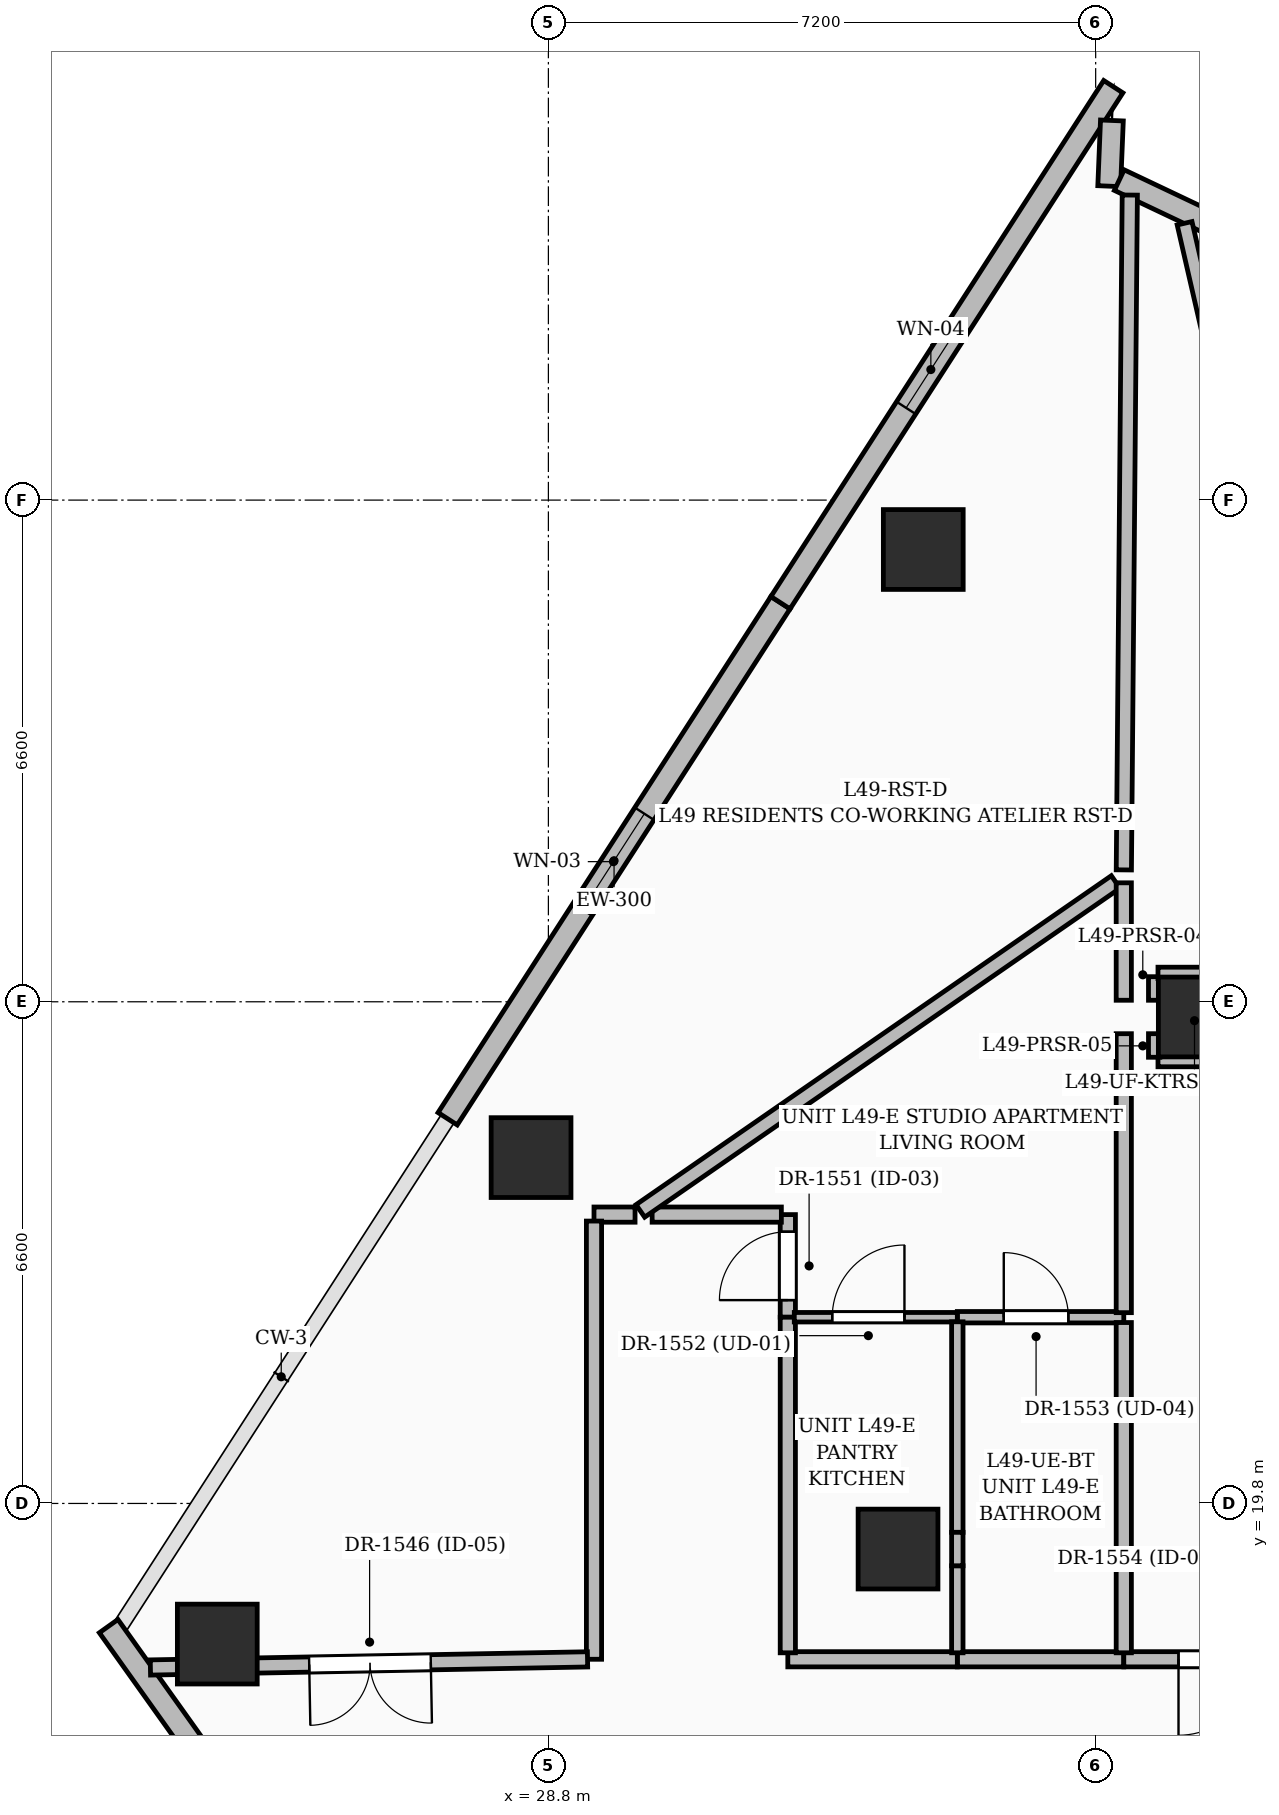
"""IFC4 building model, lengths in metres.
Left out: names, types, materials, properties, quantities, classifications, styles, units other than length and angle.
Written with IfcOpenShell. Run it as: python <this file> out.ifc"""

import sys

from ifc_helpers import new_model, si_unit, direction, frame, frame_2d, origin, origin_2d, place, context, subcontext, project, spatial, rectangle, extrude, element, fill, save


model = new_model("IFC4")
c1 = context("Model", 3, precision=1e-05, world=origin(), true_north=direction((0.0, 1.0)))
c2 = subcontext(c1, "Body", "Model", "MODEL_VIEW")
j1 = project(units=[si_unit("LENGTHUNIT", "METRE"), si_unit("PLANEANGLEUNIT", "RADIAN")], contexts=[c1])
p1 = place(None, origin())
s1 = spatial("IfcSite", under=j1, at=p1, CompositionType="ELEMENT")
p2 = place(p1, origin())
s2 = spatial("IfcBuilding", under=s1, at=p2, CompositionType="ELEMENT")
p3 = place(p2, frame((0.0, 0.0, 189.6)))
s3 = spatial("IfcBuildingStorey", under=s2, at=p3, CompositionType="ELEMENT", Elevation=189.6)
for number, where, z_axis, x_axis in (
    (1, (37.35, 26.2, 0.0), (0.0, 0.0, 1.0), (1.0, 0.0, 0.0)),
    (2, (33.4, 19.2, 0.0), (0.0, 0.0, 1.0), (1.0, 0.0, 0.0)),
    (3, (33.732, 32.35, 0.0), (0.0, 0.0, 1.0), (1.0, 0.0, 0.0)),
    (4, (28.572, 24.35, 0.0), (0.0, 0.0, 1.0), (1.0, 0.0, 0.0)),
    (5, (24.444, 17.95, 0.0), (0.0, 0.0, 1.0), (1.0, 0.0, 0.0)),
):
    element("IfcColumn", number, at=place(p3, frame(where, z_axis=z_axis, x_axis=x_axis)), inside=s3, PredefinedType="COLUMN", context=c2, shape_type="SweptSolid", body=[
        extrude(rectangle(XDim=1.05, YDim=1.05, at=origin_2d()), origin(), (0.0, 0.0, 1.0), 3.6),
    ])
p4 = place(p3, frame((24.52, 16.074, 0.0), z_axis=(0.0, 0.0, 1.0), x_axis=(-0.580472212384, 0.814280056645, 0.0)))
e6 = element("IfcWall", 6, at=p4, inside=s3, PredefinedType="SOLIDWALL", context=c2, shape_type="SweptSolid", body=[
    extrude(rectangle(XDim=2.594, YDim=0.3, at=frame_2d((1.297, 0.0))), origin(), (0.0, 0.0, 1.0), 2.575),
])
p5 = place(p3, frame((27.475, 24.861, 0.0), z_axis=(0.0, 0.0, 1.0), x_axis=(0.542020169158, 0.840365477769, 0.0)))
e7 = element("IfcWall", 7, at=p5, inside=s3, PredefinedType="SOLIDWALL", context=c2, shape_type="SweptSolid", body=[
    extrude(rectangle(XDim=8.078, YDim=0.3, at=frame_2d((4.039, 0.0))), origin(), (0.0, 0.0, 1.0), 3.35),
])
p6 = place(p5, frame((3.275, 0.0, 0.6)))
e8 = element("IfcOpeningElement", 8, at=p6, cuts=e7, PredefinedType="OPENING", context=c2, shape_type="SweptSolid", body=[
    extrude(rectangle(XDim=1.5, YDim=2.1, at=frame_2d((0.75, 1.05))), frame((0.0, 0.16, 0.0), z_axis=(0.0, -1.0, 0.0), x_axis=(1.0, 0.0, 0.0)), (0.0, 0.0, 1.0), 0.32),
])
p7 = place(p3, frame((31.853, 31.65, 0.0), z_axis=(0.0, 0.0, 1.0), x_axis=(0.542006403754, 0.84037435604, 0.0)))
e9 = element("IfcWall", 9, at=p7, inside=s3, PredefinedType="SOLIDWALL", context=c2, shape_type="SweptSolid", body=[
    extrude(rectangle(XDim=8.079, YDim=0.3, at=frame_2d((4.039, 0.0))), origin(), (0.0, 0.0, 1.0), 3.35),
])
p8 = place(p7, frame((3.05, 0.0, 0.8)))
e10 = element("IfcOpeningElement", 10, at=p8, cuts=e9, PredefinedType="OPENING", context=c2, shape_type="SweptSolid", body=[
    extrude(rectangle(XDim=1.2, YDim=1.8, at=frame_2d((0.6, 0.9))), frame((0.0, 0.16, 0.0), z_axis=(0.0, -1.0, 0.0), x_axis=(1.0, 0.0, 0.0)), (0.0, 0.0, 1.0), 0.32),
])
p9 = place(p3, frame((36.214, 37.994, 0.0), z_axis=(0.0, 0.0, 1.0), x_axis=(-0.040926134278, -0.999162174791, 0.0)))
e11 = element("IfcWall", 11, at=p9, inside=s3, PredefinedType="SOLIDWALL", context=c2, shape_type="SweptSolid", body=[
    extrude(rectangle(XDim=0.865, YDim=0.3, at=frame_2d((0.433, 0.0))), origin(), (0.0, 0.0, 1.0), 3.35),
])
p10 = place(p3, frame((36.311, 37.21, 0.0), z_axis=(0.0, 0.0, 1.0), x_axis=(0.903471604204, -0.428647944585, 0.0)))
e12 = element("IfcWall", 12, at=p10, inside=s3, PredefinedType="SOLIDWALL", context=c2, shape_type="SweptSolid", body=[
    extrude(rectangle(XDim=2.205, YDim=0.3, at=frame_2d((1.103, 0.0))), origin(), (0.0, 0.0, 1.0), 3.35),
])
p11 = place(p3, frame((29.94, 23.6, 0.0), z_axis=(0.0, 0.0, 1.0), x_axis=(-1.0, 0.0, 0.0)))
e13 = element("IfcWall", 13, at=p11, inside=s3, PredefinedType="PARTITIONING", context=c2, shape_type="SweptSolid", body=[
    extrude(rectangle(XDim=0.54, YDim=0.2, at=frame_2d((0.27, 0.0))), origin(), (0.0, 0.0, 1.0), 2.464),
])
p12 = place(p3, frame((29.4, 23.515, 0.0), z_axis=(0.0, 0.0, 1.0), x_axis=(0.0, -1.0, 0.0)))
e14 = element("IfcWall", 14, at=p12, inside=s3, PredefinedType="PARTITIONING", context=c2, shape_type="SweptSolid", body=[
    extrude(rectangle(XDim=5.765, YDim=0.2, at=frame_2d((2.882, 0.0))), origin(), (0.0, 0.0, 1.0), 2.464),
])
p13 = place(p3, frame((29.315, 17.749, 0.0), z_axis=(0.0, 0.0, 1.0), x_axis=(-0.999827964646, -0.018548345243, 0.0)))
e15 = element("IfcWall", 15, at=p13, inside=s3, PredefinedType="PARTITIONING", context=c2, shape_type="SweptSolid", body=[
    extrude(rectangle(XDim=5.752, YDim=0.2, at=frame_2d((2.876, 0.0))), origin(), (0.0, 0.0, 1.0), 2.464),
])
p14 = place(p13, frame((2.062, 0.0, 0.0)))
e16 = element("IfcOpeningElement", 16, at=p14, cuts=e15, PredefinedType="OPENING", context=c2, shape_type="SweptSolid", body=[
    extrude(rectangle(XDim=1.6, YDim=2.3, at=frame_2d((0.8, 1.15))), frame((0.0, 0.11, 0.0), z_axis=(0.0, -1.0, 0.0), x_axis=(1.0, 0.0, 0.0)), (0.0, 0.0, 1.0), 0.22),
])
p15 = place(p3, frame((31.95, 22.25, 0.0), z_axis=(0.0, 0.0, 1.0), x_axis=(0.0, 1.0, 0.0)))
e17 = element("IfcWall", 17, at=p15, inside=s3, PredefinedType="PARTITIONING", context=c2, shape_type="SweptSolid", body=[
    extrude(rectangle(XDim=1.35, YDim=0.2, at=frame_2d((0.675, 0.0))), origin(), (0.0, 0.0, 1.0), 2.712),
])
p16 = place(p15, frame((0.225, 0.0, 0.0)))
e18 = element("IfcOpeningElement", 18, at=p16, cuts=e17, PredefinedType="OPENING", context=c2, shape_type="SweptSolid", body=[
    extrude(rectangle(XDim=0.9, YDim=2.1, at=frame_2d((0.45, 1.05))), frame((0.0, 0.11, 0.0), z_axis=(0.0, -1.0, 0.0), x_axis=(1.0, 0.0, 0.0)), (0.0, 0.0, 1.0), 0.22),
])
p17 = place(p3, frame((31.865, 23.6, 0.0), z_axis=(0.0, 0.0, 1.0), x_axis=(-1.0, 0.0, 0.0)))
e19 = element("IfcWall", 19, at=p17, inside=s3, PredefinedType="PARTITIONING", context=c2, shape_type="SweptSolid", body=[
    extrude(rectangle(XDim=1.7, YDim=0.2, at=frame_2d((0.85, 0.0))), origin(), (0.0, 0.0, 1.0), 3.35),
])
p18 = place(p3, frame((36.37, 17.75, 0.0), z_axis=(0.0, 0.0, 1.0), x_axis=(-1.0, 0.0, 0.0)))
e20 = element("IfcWall", 20, at=p18, inside=s3, PredefinedType="PARTITIONING", context=c2, shape_type="SweptSolid", body=[
    extrude(rectangle(XDim=2.19, YDim=0.2, at=frame_2d((1.095, 0.0))), origin(), (0.0, 0.0, 1.0), 2.436),
])
p19 = place(p3, frame((34.18, 17.75, 0.0), z_axis=(0.0, 0.0, 1.0), x_axis=(-1.0, 0.0, 0.0)))
e21 = element("IfcWall", 21, at=p19, inside=s3, PredefinedType="PARTITIONING", context=c2, shape_type="SweptSolid", body=[
    extrude(rectangle(XDim=2.23, YDim=0.2, at=frame_2d((1.115, 0.0))), origin(), (0.0, 0.0, 1.0), 2.436),
])
p20 = place(p3, frame((31.95, 17.835, 0.0), z_axis=(0.0, 0.0, 1.0), x_axis=(0.0, 1.0, 0.0)))
e22 = element("IfcWall", 22, at=p20, inside=s3, PredefinedType="PARTITIONING", context=c2, shape_type="SweptSolid", body=[
    extrude(rectangle(XDim=4.415, YDim=0.2, at=frame_2d((2.208, 0.0))), origin(), (0.0, 0.0, 1.0), 2.464),
])
p21 = place(p3, frame((38.81, 17.75, 0.0), z_axis=(0.0, 0.0, 1.0), x_axis=(-1.0, 0.0, 0.0)))
e23 = element("IfcWall", 23, at=p21, inside=s3, PredefinedType="PARTITIONING", context=c2, shape_type="SweptSolid", body=[
    extrude(rectangle(XDim=2.44, YDim=0.2, at=frame_2d((1.22, 0.0))), origin(), (0.0, 0.0, 1.0), 3.35),
])
p22 = place(p21, frame((0.72, 0.0, 0.0)))
e24 = element("IfcOpeningElement", 24, at=p22, cuts=e23, PredefinedType="OPENING", context=c2, shape_type="SweptSolid", body=[
    extrude(rectangle(XDim=1.0, YDim=2.2, at=frame_2d((0.5, 1.1))), frame((0.0, 0.11, 0.0), z_axis=(0.0, -1.0, 0.0), x_axis=(1.0, 0.0, 0.0)), (0.0, 0.0, 1.0), 0.22),
])
p23 = place(p3, frame((30.01, 23.648, 0.0), z_axis=(0.0, 0.0, 1.0), x_axis=(0.822283485257, 0.569078087677, 0.0)))
e25 = element("IfcWall", 25, at=p23, inside=s3, PredefinedType="PARTITIONING", context=c2, shape_type="SweptSolid", body=[
    extrude(rectangle(XDim=7.605, YDim=0.2, at=frame_2d((3.802, 0.0))), origin(), (0.0, 0.0, 1.0), 2.464),
])
p24 = place(p3, frame((36.371, 28.135, 0.0), z_axis=(0.0, 0.0, 1.0), x_axis=(0.008827067816, 0.999961040678, 0.0)))
e26 = element("IfcWall", 26, at=p24, inside=s3, PredefinedType="PARTITIONING", context=c2, shape_type="SweptSolid", body=[
    extrude(rectangle(XDim=8.878, YDim=0.2, at=frame_2d((4.439, 0.0))), origin(), (0.0, 0.0, 1.0), 2.464),
])
p25 = place(p3, frame((34.18, 22.25, 0.0), z_axis=(0.0, 0.0, 1.0), x_axis=(1.0, 0.0, 0.0)))
e27 = element("IfcWall", 27, at=p25, inside=s3, PredefinedType="PARTITIONING", context=c2, shape_type="SweptSolid", body=[
    extrude(rectangle(XDim=2.19, YDim=0.15, at=frame_2d((1.095, 0.0))), origin(), (0.0, 0.0, 1.0), 2.436),
])
p26 = place(p25, frame((0.611, 0.0, 0.0)))
e28 = element("IfcOpeningElement", 28, at=p26, cuts=e27, PredefinedType="OPENING", context=c2, shape_type="SweptSolid", body=[
    extrude(rectangle(XDim=0.85, YDim=2.1, at=frame_2d((0.425, 1.05))), frame((0.0, 0.085, 0.0), z_axis=(0.0, -1.0, 0.0), x_axis=(1.0, 0.0, 0.0)), (0.0, 0.0, 1.0), 0.17),
])
p27 = place(p3, frame((32.035, 22.25, 0.0), z_axis=(0.0, 0.0, 1.0), x_axis=(1.0, 0.0, 0.0)))
e29 = element("IfcWall", 29, at=p27, inside=s3, PredefinedType="PARTITIONING", context=c2, shape_type="SweptSolid", body=[
    extrude(rectangle(XDim=2.145, YDim=0.125, at=frame_2d((1.073, 0.0))), origin(), (0.0, 0.0, 1.0), 2.712),
])
p28 = place(p27, frame((0.5, 0.0, 0.0)))
e30 = element("IfcOpeningElement", 30, at=p28, cuts=e29, PredefinedType="OPENING", context=c2, shape_type="SweptSolid", body=[
    extrude(rectangle(XDim=0.95, YDim=2.2, at=frame_2d((0.475, 1.1))), frame((0.0, 0.072, 0.0), z_axis=(0.0, -1.0, 0.0), x_axis=(1.0, 0.0, 0.0)), (0.0, 0.0, 1.0), 0.145),
])
p29 = place(p3, frame((36.37, 22.31, 0.0), z_axis=(0.0, 0.0, 1.0), x_axis=(0.0, 1.0, 0.0)))
e31 = element("IfcWall", 31, at=p29, inside=s3, PredefinedType="PARTITIONING", context=c2, shape_type="SweptSolid", body=[
    extrude(rectangle(XDim=3.67, YDim=0.2, at=frame_2d((1.835, 0.0))), origin(), (0.0, 0.0, 1.0), 2.436),
])
p30 = place(p3, frame((36.37, 26.42, 0.0), z_axis=(0.0, 0.0, 1.0), x_axis=(0.0, 1.0, 0.0)))
e32 = element("IfcWall", 32, at=p30, inside=s3, PredefinedType="PARTITIONING", context=c2, shape_type="SweptSolid", body=[
    extrude(rectangle(XDim=1.545, YDim=0.2, at=frame_2d((0.772, 0.0))), origin(), (0.0, 0.0, 1.0), 2.464),
])
p31 = place(p3, frame((34.18, 18.98, 0.0), z_axis=(0.0, 0.0, 1.0), x_axis=(0.0, -1.0, 0.0)))
e33 = element("IfcWall", 33, at=p31, inside=s3, PredefinedType="PARTITIONING", context=c2, shape_type="SweptSolid", body=[
    extrude(rectangle(XDim=1.145, YDim=0.15, at=frame_2d((0.573, 0.0))), origin(), (0.0, 0.0, 1.0), 2.436),
])
p32 = place(p3, frame((34.18, 22.19, 0.0), z_axis=(0.0, 0.0, 1.0), x_axis=(0.0, -1.0, 0.0)))
e34 = element("IfcWall", 34, at=p32, inside=s3, PredefinedType="PARTITIONING", context=c2, shape_type="SweptSolid", body=[
    extrude(rectangle(XDim=2.77, YDim=0.15, at=frame_2d((1.385, 0.0))), origin(), (0.0, 0.0, 1.0), 2.436),
])
p33 = place(p3, frame((36.37, 17.835, 0.0), z_axis=(0.0, 0.0, 1.0), x_axis=(0.0, 1.0, 0.0)))
e35 = element("IfcWall", 35, at=p33, inside=s3, PredefinedType="PARTITIONING", context=c2, shape_type="SweptSolid", body=[
    extrude(rectangle(XDim=4.345, YDim=0.2, at=frame_2d((2.172, 0.0))), origin(), (0.0, 0.0, 1.0), 2.853),
])
p34 = place(p3, frame((38.81, 29.51, 0.0), z_axis=(0.0, 0.0, 1.0), x_axis=(-0.224116325186, 0.974562400663, 0.0)))
e36 = element("IfcWall", 36, at=p34, inside=s3, PredefinedType="PARTITIONING", context=c2, shape_type="SweptSolid", body=[
    extrude(rectangle(XDim=7.318, YDim=0.2, at=frame_2d((3.659, 0.0))), origin(), (0.0, 0.0, 1.0), 2.57),
])
p35 = place(p3, frame((34.18, 19.42, 0.0), z_axis=(0.0, 0.0, 1.0), x_axis=(0.0, -1.0, 0.0)))
e37 = element("IfcWall", 37, at=p35, inside=s3, PredefinedType="PARTITIONING", context=c2, shape_type="SweptSolid", body=[
    extrude(rectangle(XDim=0.44, YDim=0.15, at=frame_2d((0.22, 0.0))), origin(), (0.0, 0.0, 1.0), 2.853),
])
p36 = place(p3, frame((36.77, 26.42, 0.0), z_axis=(0.0, 0.0, 1.0), x_axis=(0.0, 1.0, 0.0)))
e38 = element("IfcWall", 38, at=p36, inside=s3, PredefinedType="PARTITIONING", context=c2, shape_type="SweptSolid", body=[
    extrude(rectangle(XDim=0.31, YDim=0.15, at=frame_2d((0.155, 0.0))), origin(), (0.0, 0.0, 1.0), 2.464),
])
p37 = place(p3, frame((36.82, 26.78, 0.0), z_axis=(0.0, 0.0, 1.0), x_axis=(1.0, 0.0, 0.0)))
e39 = element("IfcWall", 39, at=p37, inside=s3, PredefinedType="PARTITIONING", context=c2, shape_type="SweptSolid", body=[
    extrude(rectangle(XDim=1.07, YDim=0.15, at=frame_2d((0.535, 0.0))), origin(), (0.0, 0.0, 1.0), 2.464),
])
p38 = place(p3, frame((37.89, 25.62, 0.0), z_axis=(0.0, 0.0, 1.0), x_axis=(-1.0, 0.0, 0.0)))
e40 = element("IfcWall", 40, at=p38, inside=s3, PredefinedType="PARTITIONING", context=c2, shape_type="SweptSolid", body=[
    extrude(rectangle(XDim=1.07, YDim=0.15, at=frame_2d((0.535, 0.0))), origin(), (0.0, 0.0, 1.0), 2.436),
])
p39 = place(p3, frame((36.77, 25.67, 0.0), z_axis=(0.0, 0.0, 1.0), x_axis=(0.0, 1.0, 0.0)))
e41 = element("IfcWall", 41, at=p39, inside=s3, PredefinedType="PARTITIONING", context=c2, shape_type="SweptSolid", body=[
    extrude(rectangle(XDim=0.31, YDim=0.15, at=frame_2d((0.155, 0.0))), origin(), (0.0, 0.0, 1.0), 3.35),
])
p40 = place(p6, origin())
e42 = element("IfcWindow", 42, at=p40, inside=s3, PartitioningType="SINGLE_PANEL", PredefinedType="WINDOW", context=c2, shape_type="SweptSolid", body=[
    extrude(rectangle(XDim=1.5, YDim=2.1, at=frame_2d((0.75, 1.05))), frame((0.0, 0.03, 0.0), z_axis=(0.0, -1.0, 0.0), x_axis=(1.0, 0.0, 0.0)), (0.0, 0.0, 1.0), 0.06),
])
fill(e8, e42)
p41 = place(p8, origin())
e43 = element("IfcWindow", 43, at=p41, inside=s3, PartitioningType="SINGLE_PANEL", PredefinedType="WINDOW", context=c2, shape_type="SweptSolid", body=[
    extrude(rectangle(XDim=1.2, YDim=1.8, at=frame_2d((0.6, 0.9))), frame((0.0, 0.03, 0.0), z_axis=(0.0, -1.0, 0.0), x_axis=(1.0, 0.0, 0.0)), (0.0, 0.0, 1.0), 0.06),
])
fill(e10, e43)
p42 = place(p14, origin())
e44 = element("IfcDoor", 44, at=p42, inside=s3, OperationType="DOUBLE_DOOR_SINGLE_SWING", PredefinedType="DOOR", context=c2, shape_type="SweptSolid", body=[
    extrude(rectangle(XDim=1.6, YDim=2.3, at=frame_2d((0.8, 1.15))), frame((0.0, 0.025, 0.0), z_axis=(0.0, -1.0, 0.0), x_axis=(1.0, 0.0, 0.0)), (0.0, 0.0, 1.0), 0.05),
])
fill(e16, e44)
p43 = place(p16, origin())
e45 = element("IfcDoor", 45, at=p43, inside=s3, OperationType="SINGLE_SWING_LEFT", PredefinedType="DOOR", context=c2, shape_type="SweptSolid", body=[
    extrude(rectangle(XDim=0.9, YDim=2.1, at=frame_2d((0.45, 1.05))), frame((0.0, 0.025, 0.0), z_axis=(0.0, -1.0, 0.0), x_axis=(1.0, 0.0, 0.0)), (0.0, 0.0, 1.0), 0.05),
])
fill(e18, e45)
p44 = place(p28, origin())
e46 = element("IfcDoor", 46, at=p44, inside=s3, OperationType="SINGLE_SWING_RIGHT", PredefinedType="DOOR", context=c2, shape_type="SweptSolid", body=[
    extrude(rectangle(XDim=0.95, YDim=2.2, at=frame_2d((0.475, 1.1))), frame((0.0, 0.025, 0.0), z_axis=(0.0, -1.0, 0.0), x_axis=(1.0, 0.0, 0.0)), (0.0, 0.0, 1.0), 0.05),
])
fill(e30, e46)
p45 = place(p26, origin())
e47 = element("IfcDoor", 47, at=p45, inside=s3, OperationType="SINGLE_SWING_LEFT", PredefinedType="DOOR", context=c2, shape_type="SweptSolid", body=[
    extrude(rectangle(XDim=0.85, YDim=2.1, at=frame_2d((0.425, 1.05))), frame((0.0, 0.025, 0.0), z_axis=(0.0, -1.0, 0.0), x_axis=(1.0, 0.0, 0.0)), (0.0, 0.0, 1.0), 0.05),
])
fill(e28, e47)
p46 = place(p22, origin())
e48 = element("IfcDoor", 48, at=p46, inside=s3, OperationType="SINGLE_SWING_RIGHT", PredefinedType="DOOR", context=c2, shape_type="SweptSolid", body=[
    extrude(rectangle(XDim=1.0, YDim=2.2, at=frame_2d((0.5, 1.1))), frame((0.0, 0.025, 0.0), z_axis=(0.0, -1.0, 0.0), x_axis=(1.0, 0.0, 0.0)), (0.0, 0.0, 1.0), 0.05),
])
fill(e24, e48)
save(model, sys.argv[1])
